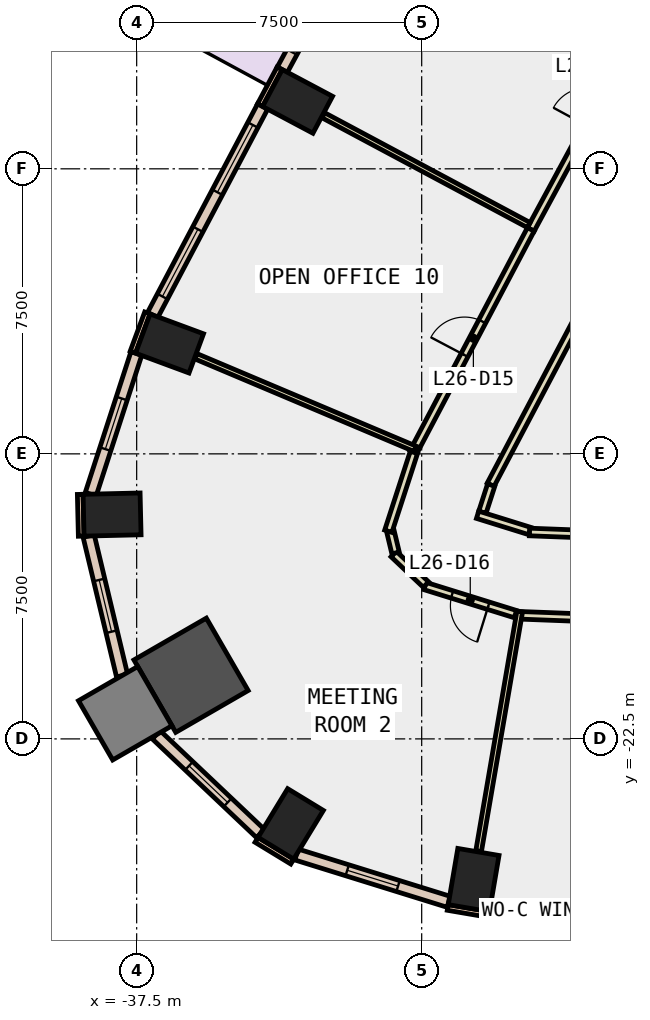
"""IFC4 building model, lengths in metres.
Left out: names, types, materials, properties, quantities, classifications, styles, units other than length and angle.
Written with IfcOpenShell. Run it as: python <this file> out.ifc"""

import sys

from ifc_helpers import new_model, si_unit, direction, frame, frame_2d, origin, origin_2d, place, context, subcontext, project, spatial, rectangle, extrude, element, fill, save


model = new_model("IFC4")
c1 = context("Model", 3, precision=1e-05, world=origin(), true_north=direction((0.0, 1.0)))
c2 = subcontext(c1, "Body", "Model", "MODEL_VIEW")
j1 = project(units=[si_unit("LENGTHUNIT", "METRE"), si_unit("PLANEANGLEUNIT", "RADIAN")], contexts=[c1])
p1 = place(None, origin())
s1 = spatial("IfcSite", under=j1, at=p1, CompositionType="ELEMENT")
p2 = place(p1, origin())
s2 = spatial("IfcBuilding", under=s1, at=p2, CompositionType="ELEMENT")
p3 = place(p2, frame((0.0, 0.0, 120.2)))
s3 = spatial("IfcBuildingStorey", under=s2, at=p3, CompositionType="ELEMENT", Elevation=120.2)
for number, where, z_axis, x_axis in (
    (1, (-28.633, -26.214, -0.4), (0.0, 0.0, 1.0), (-0.986, 0.168, 0.0)),
    (2, (-33.266, -5.726, -0.4), (0.0, 0.0, 1.0), (0.469, 0.883, 0.0)),
    (3, (-36.635, -12.096, -0.4), (0.0, 0.0, 1.0), (0.347, 0.938, 0.0)),
    (4, (-38.147, -16.597, -0.4), (0.0, 0.0, 1.0), (-0.023, 1.0, 0.0)),
):
    element("IfcColumn", number, at=place(p3, frame(where, z_axis=z_axis, x_axis=x_axis)), inside=s3, PredefinedType="COLUMN", context=c2, shape_type="SweptSolid", body=[
        extrude(rectangle(XDim=1.1, YDim=1.5, at=origin_2d()), origin(), (0.0, 0.0, 1.0), 4.2),
    ])
p4 = place(p3, frame((-36.069, -20.825, -0.4), z_axis=(0.0, 0.0, 1.0), x_axis=(0.866025403784, 0.5, 0.0)))
e5 = element("IfcColumn", 5, at=p4, inside=s3, PredefinedType="COLUMN", context=c2, shape_type="SweptSolid", body=[
    extrude(rectangle(XDim=2.2, YDim=2.2, at=origin_2d()), origin(), (0.0, 0.0, 1.0), 4.2),
])
p5 = place(p3, frame((-33.447, -24.737, -0.4), z_axis=(0.0, 0.0, 1.0), x_axis=(-0.854095929175, 0.520115510024, 0.0)))
e6 = element("IfcColumn", 6, at=p5, inside=s3, PredefinedType="COLUMN", context=c2, shape_type="SweptSolid", body=[
    extrude(rectangle(XDim=1.1, YDim=1.5, at=origin_2d()), origin(), (0.0, 0.0, 1.0), 4.2),
])
p6 = place(p3, frame((-37.801, -21.825, -0.4), z_axis=(0.0, 0.0, 1.0), x_axis=(0.866025403784, 0.5, 0.0)))
e7 = element("IfcColumn", 7, at=p6, inside=s3, PredefinedType="COLUMN", context=c2, shape_type="SweptSolid", body=[
    extrude(rectangle(XDim=1.8, YDim=1.8, at=origin_2d()), origin(), (0.0, 0.0, 1.0), 4.2),
])
p7 = place(p3, frame((-33.737, -4.854, 0.0), z_axis=(0.0, 0.0, 1.0), x_axis=(-0.46919310775, -0.883095593716, 0.0)))
e8 = element("IfcWall", 8, at=p7, inside=s3, PredefinedType="STANDARD", context=c2, shape_type="SweptSolid", body=[
    extrude(rectangle(XDim=1.099, YDim=0.15, at=frame_2d((0.55, 0.0))), origin(), (0.0, 0.0, 1.0), 3.8),
])
p8 = place(p3, frame((-37.218, -11.293, 0.0), z_axis=(0.0, 0.0, 1.0), x_axis=(-0.347205967468, -0.937788897436, 0.0)))
e9 = element("IfcWall", 9, at=p8, inside=s3, PredefinedType="STANDARD", context=c2, shape_type="SweptSolid", body=[
    extrude(rectangle(XDim=1.1, YDim=0.15, at=frame_2d((0.55, 0.0))), origin(), (0.0, 0.0, 1.0), 3.8),
])
p9 = place(p3, frame((-29.314, -26.935, 0.0), z_axis=(0.0, 0.0, 1.0), x_axis=(0.985763338892, -0.168138751323, 0.0)))
e10 = element("IfcWall", 10, at=p9, inside=s3, PredefinedType="STANDARD", context=c2, shape_type="SweptSolid", body=[
    extrude(rectangle(XDim=1.101, YDim=0.15, at=frame_2d((0.55, 0.0))), origin(), (0.0, 0.0, 1.0), 3.8),
])
for number, where, z_axis, x_axis in (
    (11, (-38.985, -16.066, 0.0), (0.0, 0.0, 1.0), (0.024, -1.0, 0.0)),
    (12, (-34.346, -25.156, 0.0), (0.0, 0.0, 1.0), (0.854, -0.52, 0.0)),
):
    element("IfcWall", number, at=place(p3, frame(where, z_axis=z_axis, x_axis=x_axis)), inside=s3, PredefinedType="STANDARD", context=c2, shape_type="SweptSolid", body=[
        extrude(rectangle(XDim=1.1, YDim=0.15, at=frame_2d((0.55, 0.0))), origin(), (0.0, 0.0, 1.0), 3.8),
    ])
p10 = place(p3, frame((-28.205, -26.973, 0.0), z_axis=(0.0, 0.0, 1.0), x_axis=(0.999266319694, -0.03829911651, 0.0)))
e13 = element("IfcWall", 13, at=p10, inside=s3, PredefinedType="STANDARD", context=c2, shape_type="SweptSolid", body=[
    extrude(rectangle(XDim=5.877, YDim=0.3, at=frame_2d((2.939, 0.0))), origin(), (0.0, 0.0, 1.0), 3.8),
])
p11 = place(p10, frame((0.469, 0.0, 0.9)))
e14 = element("IfcOpeningElement", 14, at=p11, cuts=e13, PredefinedType="OPENING", context=c2, shape_type="SweptSolid", body=[
    extrude(rectangle(XDim=2.0, YDim=2.6, at=frame_2d((1.0, 1.3))), frame((0.0, 0.16, 0.0), z_axis=(0.0, -1.0, 0.0), x_axis=(1.0, 0.0, 0.0)), (0.0, 0.0, 1.0), 0.32),
])
p12 = place(p10, frame((3.408, 0.0, 0.9)))
e15 = element("IfcOpeningElement", 15, at=p12, cuts=e13, PredefinedType="OPENING", context=c2, shape_type="SweptSolid", body=[
    extrude(rectangle(XDim=2.0, YDim=2.6, at=frame_2d((1.0, 1.3))), frame((0.0, 0.16, 0.0), z_axis=(0.0, -1.0, 0.0), x_axis=(1.0, 0.0, 0.0)), (0.0, 0.0, 1.0), 0.32),
])
p13 = place(p3, frame((-30.758, 0.481, 0.0), z_axis=(0.0, 0.0, 1.0), x_axis=(-0.476097776444, -0.879392351152, 0.0)))
e16 = element("IfcWall", 16, at=p13, inside=s3, PredefinedType="STANDARD", context=c2, shape_type="SweptSolid", body=[
    extrude(rectangle(XDim=6.11, YDim=0.3, at=frame_2d((3.055, 0.0))), origin(), (0.0, 0.0, 1.0), 3.8),
])
p14 = place(p13, frame((0.527, 0.0, 0.0)))
e17 = element("IfcOpeningElement", 17, at=p14, cuts=e16, PredefinedType="OPENING", context=c2, shape_type="SweptSolid", body=[
    extrude(rectangle(XDim=2.0, YDim=2.4, at=frame_2d((1.0, 1.2))), frame((0.0, 0.16, 0.0), z_axis=(0.0, -1.0, 0.0), x_axis=(1.0, 0.0, 0.0)), (0.0, 0.0, 1.0), 0.32),
])
p15 = place(p13, frame((3.582, 0.0, 0.9)))
e18 = element("IfcOpeningElement", 18, at=p15, cuts=e16, PredefinedType="OPENING", context=c2, shape_type="SweptSolid", body=[
    extrude(rectangle(XDim=2.0, YDim=2.6, at=frame_2d((1.0, 1.3))), frame((0.0, 0.16, 0.0), z_axis=(0.0, -1.0, 0.0), x_axis=(1.0, 0.0, 0.0)), (0.0, 0.0, 1.0), 0.32),
])
p16 = place(p3, frame((-34.185, -5.86, 0.0), z_axis=(0.0, 0.0, 1.0), x_axis=(-0.466599547852, -0.88446868907, 0.0)))
e19 = element("IfcWall", 19, at=p16, inside=s3, PredefinedType="STANDARD", context=c2, shape_type="SweptSolid", body=[
    extrude(rectangle(XDim=6.202, YDim=0.3, at=frame_2d((3.101, 0.0))), origin(), (0.0, 0.0, 1.0), 3.8),
])
p17 = place(p16, frame((0.551, 0.0, 0.9)))
e20 = element("IfcOpeningElement", 20, at=p17, cuts=e19, PredefinedType="OPENING", context=c2, shape_type="SweptSolid", body=[
    extrude(rectangle(XDim=2.0, YDim=2.6, at=frame_2d((1.0, 1.3))), frame((0.0, 0.16, 0.0), z_axis=(0.0, -1.0, 0.0), x_axis=(1.0, 0.0, 0.0)), (0.0, 0.0, 1.0), 0.32),
])
p18 = place(p16, frame((3.652, 0.0, 0.9)))
e21 = element("IfcOpeningElement", 21, at=p18, cuts=e19, PredefinedType="OPENING", context=c2, shape_type="SweptSolid", body=[
    extrude(rectangle(XDim=2.0, YDim=2.6, at=frame_2d((1.0, 1.3))), frame((0.0, 0.16, 0.0), z_axis=(0.0, -1.0, 0.0), x_axis=(1.0, 0.0, 0.0)), (0.0, 0.0, 1.0), 0.32),
])
p19 = place(p3, frame((-37.508, -12.358, 0.0), z_axis=(0.0, 0.0, 1.0), x_axis=(-0.308484760821, -0.951229284842, 0.0)))
e22 = element("IfcWall", 22, at=p19, inside=s3, PredefinedType="STANDARD", context=c2, shape_type="SweptSolid", body=[
    extrude(rectangle(XDim=3.893, YDim=0.3, at=frame_2d((1.947, 0.0))), origin(), (0.0, 0.0, 1.0), 3.8),
])
p20 = place(p19, frame((1.246, 0.0, 0.9)))
e23 = element("IfcOpeningElement", 23, at=p20, cuts=e22, PredefinedType="OPENING", context=c2, shape_type="SweptSolid", body=[
    extrude(rectangle(XDim=1.4, YDim=2.6, at=frame_2d((0.7, 1.3))), frame((0.0, 0.16, 0.0), z_axis=(0.0, -1.0, 0.0), x_axis=(1.0, 0.0, 0.0)), (0.0, 0.0, 1.0), 0.32),
])
p21 = place(p3, frame((-38.763, -17.161, 0.0), z_axis=(0.0, 0.0, 1.0), x_axis=(0.232654276823, -0.972559503309, 0.0)))
e24 = element("IfcWall", 24, at=p21, inside=s3, PredefinedType="STANDARD", context=c2, shape_type="SweptSolid", body=[
    extrude(rectangle(XDim=3.778, YDim=0.3, at=frame_2d((1.889, 0.0))), origin(), (0.0, 0.0, 1.0), 3.8),
])
p22 = place(p21, frame((1.189, 0.0, 0.9)))
e25 = element("IfcOpeningElement", 25, at=p22, cuts=e24, PredefinedType="OPENING", context=c2, shape_type="SweptSolid", body=[
    extrude(rectangle(XDim=1.4, YDim=2.6, at=frame_2d((0.7, 1.3))), frame((0.0, 0.16, 0.0), z_axis=(0.0, -1.0, 0.0), x_axis=(1.0, 0.0, 0.0)), (0.0, 0.0, 1.0), 0.32),
])
p23 = place(p3, frame((-36.985, -22.392, 0.0), z_axis=(0.0, 0.0, 1.0), x_axis=(0.726076674532, -0.687613745281, 0.0)))
e26 = element("IfcWall", 26, at=p23, inside=s3, PredefinedType="STANDARD", context=c2, shape_type="SweptSolid", body=[
    extrude(rectangle(XDim=3.777, YDim=0.3, at=frame_2d((1.888, 0.0))), origin(), (0.0, 0.0, 1.0), 3.8),
])
p24 = place(p23, frame((1.188, 0.0, 0.9)))
e27 = element("IfcOpeningElement", 27, at=p24, cuts=e26, PredefinedType="OPENING", context=c2, shape_type="SweptSolid", body=[
    extrude(rectangle(XDim=1.4, YDim=2.6, at=frame_2d((0.7, 1.3))), frame((0.0, 0.16, 0.0), z_axis=(0.0, -1.0, 0.0), x_axis=(1.0, 0.0, 0.0)), (0.0, 0.0, 1.0), 0.32),
])
p25 = place(p3, frame((-33.294, -25.542, 0.0), z_axis=(0.0, 0.0, 1.0), x_axis=(0.954955020021, -0.296750585066, 0.0)))
e28 = element("IfcWall", 28, at=p25, inside=s3, PredefinedType="STANDARD", context=c2, shape_type="SweptSolid", body=[
    extrude(rectangle(XDim=4.196, YDim=0.3, at=frame_2d((2.098, 0.0))), origin(), (0.0, 0.0, 1.0), 3.8),
])
p26 = place(p25, frame((1.398, 0.0, 0.9)))
e29 = element("IfcOpeningElement", 29, at=p26, cuts=e28, PredefinedType="OPENING", context=c2, shape_type="SweptSolid", body=[
    extrude(rectangle(XDim=1.4, YDim=2.6, at=frame_2d((0.7, 1.3))), frame((0.0, 0.16, 0.0), z_axis=(0.0, -1.0, 0.0), x_axis=(1.0, 0.0, 0.0)), (0.0, 0.0, 1.0), 0.32),
])
p27 = place(p3, frame((-25.153, -10.065, 0.0), z_axis=(0.0, 0.0, 1.0), x_axis=(-0.466663976618, -0.884434696813, 0.0)))
e30 = element("IfcWall", 30, at=p27, inside=s3, PredefinedType="PARTITIONING", context=c2, shape_type="SweptSolid", body=[
    extrude(rectangle(XDim=6.501, YDim=0.2, at=frame_2d((3.25, 0.0))), origin(), (0.0, 0.0, 1.0), 3.8),
])
p28 = place(p3, frame((-28.171, -15.821, 0.0), z_axis=(0.0, 0.0, 1.0), x_axis=(-0.308053137273, -0.951369152651, 0.0)))
e31 = element("IfcWall", 31, at=p28, inside=s3, PredefinedType="PARTITIONING", context=c2, shape_type="SweptSolid", body=[
    extrude(rectangle(XDim=0.754, YDim=0.2, at=frame_2d((0.377, 0.0))), origin(), (0.0, 0.0, 1.0), 3.8),
])
p29 = place(p3, frame((-28.529, -16.603, 0.0), z_axis=(0.0, 0.0, 1.0), x_axis=(0.954829998701, -0.297152609916, 0.0)))
e32 = element("IfcWall", 32, at=p29, inside=s3, PredefinedType="PARTITIONING", context=c2, shape_type="SweptSolid", body=[
    extrude(rectangle(XDim=1.437, YDim=0.2, at=frame_2d((0.719, 0.0))), origin(), (0.0, 0.0, 1.0), 3.8),
])
p30 = place(p3, frame((-27.162, -17.056, 0.0), z_axis=(0.0, 0.0, 1.0), x_axis=(0.999270868304, -0.038180253525, 0.0)))
e33 = element("IfcWall", 33, at=p30, inside=s3, PredefinedType="PARTITIONING", context=c2, shape_type="SweptSolid", body=[
    extrude(rectangle(XDim=5.71, YDim=0.2, at=frame_2d((2.855, 0.0))), origin(), (0.0, 0.0, 1.0), 3.8),
])
p31 = place(p3, frame((-27.129, -9.094, 0.0), z_axis=(0.0, 0.0, 1.0), x_axis=(0.476090835435, 0.879396108938, 0.0)))
e34 = element("IfcWall", 34, at=p31, inside=s3, PredefinedType="PARTITIONING", context=c2, shape_type="SweptSolid", body=[
    extrude(rectangle(XDim=7.198, YDim=0.2, at=frame_2d((3.599, 0.0))), origin(), (0.0, 0.0, 1.0), 3.8),
])
p32 = place(p31, frame((3.099, 0.0, 0.0)))
e35 = element("IfcOpeningElement", 35, at=p32, cuts=e34, PredefinedType="OPENING", context=c2, shape_type="SweptSolid", body=[
    extrude(rectangle(XDim=1.0, YDim=2.1, at=frame_2d((0.5, 1.05))), frame((0.0, 0.11, 0.0), z_axis=(0.0, -1.0, 0.0), x_axis=(1.0, 0.0, 0.0)), (0.0, 0.0, 1.0), 0.22),
])
p33 = place(p3, frame((-30.221, -14.956, 0.0), z_axis=(0.0, 0.0, 1.0), x_axis=(0.466543318111, 0.884498350663, 0.0)))
e36 = element("IfcWall", 36, at=p33, inside=s3, PredefinedType="PARTITIONING", context=c2, shape_type="SweptSolid", body=[
    extrude(rectangle(XDim=6.627, YDim=0.2, at=frame_2d((3.314, 0.0))), origin(), (0.0, 0.0, 1.0), 3.8),
])
p34 = place(p33, frame((2.889, 0.0, 0.0)))
e37 = element("IfcOpeningElement", 37, at=p34, cuts=e36, PredefinedType="OPENING", context=c2, shape_type="SweptSolid", body=[
    extrude(rectangle(XDim=1.0, YDim=2.1, at=frame_2d((0.5, 1.05))), frame((0.0, 0.11, 0.0), z_axis=(0.0, -1.0, 0.0), x_axis=(1.0, 0.0, 0.0)), (0.0, 0.0, 1.0), 0.22),
])
p35 = place(p3, frame((-27.533, -19.217, 0.0), z_axis=(0.0, 0.0, 1.0), x_axis=(-0.954946345159, 0.296778499671, 0.0)))
e38 = element("IfcWall", 38, at=p35, inside=s3, PredefinedType="PARTITIONING", context=c2, shape_type="SweptSolid", body=[
    extrude(rectangle(XDim=2.49, YDim=0.2, at=frame_2d((1.245, 0.0))), origin(), (0.0, 0.0, 1.0), 3.8),
])
p36 = place(p35, frame((0.745, 0.0, 0.0)))
e39 = element("IfcOpeningElement", 39, at=p36, cuts=e38, PredefinedType="OPENING", context=c2, shape_type="SweptSolid", body=[
    extrude(rectangle(XDim=1.0, YDim=2.1, at=frame_2d((0.5, 1.05))), frame((0.0, 0.11, 0.0), z_axis=(0.0, -1.0, 0.0), x_axis=(1.0, 0.0, 0.0)), (0.0, 0.0, 1.0), 0.22),
])
p37 = place(p3, frame((-29.888, -18.439, 0.0), z_axis=(0.0, 0.0, 1.0), x_axis=(-0.726155646563, 0.687530346214, 0.0)))
e40 = element("IfcWall", 40, at=p37, inside=s3, PredefinedType="PARTITIONING", context=c2, shape_type="SweptSolid", body=[
    extrude(rectangle(XDim=1.169, YDim=0.2, at=frame_2d((0.585, 0.0))), origin(), (0.0, 0.0, 1.0), 3.8),
])
p38 = place(p3, frame((-30.687, -17.607, 0.0), z_axis=(0.0, 0.0, 1.0), x_axis=(-0.232504544059, 0.972595309978, 0.0)))
e41 = element("IfcWall", 41, at=p38, inside=s3, PredefinedType="PARTITIONING", context=c2, shape_type="SweptSolid", body=[
    extrude(rectangle(XDim=0.585, YDim=0.2, at=frame_2d((0.292, 0.0))), origin(), (0.0, 0.0, 1.0), 3.8),
])
p39 = place(p3, frame((-30.878, -17.036, 0.0), z_axis=(0.0, 0.0, 1.0), x_axis=(0.308592319841, 0.951194396606, 0.0)))
e42 = element("IfcWall", 42, at=p39, inside=s3, PredefinedType="PARTITIONING", context=c2, shape_type="SweptSolid", body=[
    extrude(rectangle(XDim=2.18, YDim=0.2, at=frame_2d((1.09, 0.0))), origin(), (0.0, 0.0, 1.0), 3.8),
])
p40 = place(p3, frame((-21.529, -19.473, 0.0), z_axis=(0.0, 0.0, 1.0), x_axis=(-0.999270076349, 0.038200975307, 0.0)))
e43 = element("IfcWall", 43, at=p40, inside=s3, PredefinedType="PARTITIONING", context=c2, shape_type="SweptSolid", body=[
    extrude(rectangle(XDim=5.937, YDim=0.2, at=frame_2d((2.969, 0.0))), origin(), (0.0, 0.0, 1.0), 3.8),
])
p41 = place(p40, frame((2.469, 0.0, 0.0)))
e44 = element("IfcOpeningElement", 44, at=p41, cuts=e43, PredefinedType="OPENING", context=c2, shape_type="SweptSolid", body=[
    extrude(rectangle(XDim=1.0, YDim=2.1, at=frame_2d((0.5, 1.05))), frame((0.0, 0.11, 0.0), z_axis=(0.0, -1.0, 0.0), x_axis=(1.0, 0.0, 0.0)), (0.0, 0.0, 1.0), 0.22),
])
p42 = place(p3, frame((-27.182, -8.981, 0.0), z_axis=(0.0, 0.0, 1.0), x_axis=(-0.881899408669, 0.471437623647, 0.0)))
e45 = element("IfcWall", 45, at=p42, inside=s3, PredefinedType="PARTITIONING", context=c2, shape_type="SweptSolid", body=[
    extrude(rectangle(XDim=6.13, YDim=0.15, at=frame_2d((3.065, 0.0))), origin(), (0.0, 0.0, 1.0), 3.8),
])
p43 = place(p3, frame((-30.174, -14.867, 0.0), z_axis=(0.0, 0.0, 1.0), x_axis=(-0.921262609517, 0.388941132185, 0.0)))
e46 = element("IfcWall", 46, at=p43, inside=s3, PredefinedType="PARTITIONING", context=c2, shape_type="SweptSolid", body=[
    extrude(rectangle(XDim=6.258, YDim=0.15, at=frame_2d((3.129, 0.0))), origin(), (0.0, 0.0, 1.0), 3.8),
])
p44 = place(p3, frame((-27.42, -19.148, 0.0), z_axis=(0.0, 0.0, 1.0), x_axis=(-0.169086648341, -0.985601189809, 0.0)))
e47 = element("IfcWall", 47, at=p44, inside=s3, PredefinedType="PARTITIONING", context=c2, shape_type="SweptSolid", body=[
    extrude(rectangle(XDim=6.399, YDim=0.15, at=frame_2d((3.2, 0.0))), origin(), (0.0, 0.0, 1.0), 3.8),
])
p45 = place(p11, origin())
e48 = element("IfcWindow", 48, at=p45, inside=s3, PartitioningType="SINGLE_PANEL", PredefinedType="WINDOW", context=c2, shape_type="SweptSolid", body=[
    extrude(rectangle(XDim=2.0, YDim=2.6, at=frame_2d((1.0, 1.3))), frame((0.0, 0.03, 0.0), z_axis=(0.0, -1.0, 0.0), x_axis=(1.0, 0.0, 0.0)), (0.0, 0.0, 1.0), 0.06),
])
fill(e14, e48)
p46 = place(p17, origin())
e49 = element("IfcWindow", 49, at=p46, inside=s3, PartitioningType="SINGLE_PANEL", PredefinedType="WINDOW", context=c2, shape_type="SweptSolid", body=[
    extrude(rectangle(XDim=2.0, YDim=2.6, at=frame_2d((1.0, 1.3))), frame((0.0, 0.03, 0.0), z_axis=(0.0, -1.0, 0.0), x_axis=(1.0, 0.0, 0.0)), (0.0, 0.0, 1.0), 0.06),
])
fill(e20, e49)
p47 = place(p18, origin())
e50 = element("IfcWindow", 50, at=p47, inside=s3, PartitioningType="SINGLE_PANEL", PredefinedType="WINDOW", context=c2, shape_type="SweptSolid", body=[
    extrude(rectangle(XDim=2.0, YDim=2.6, at=frame_2d((1.0, 1.3))), frame((0.0, 0.03, 0.0), z_axis=(0.0, -1.0, 0.0), x_axis=(1.0, 0.0, 0.0)), (0.0, 0.0, 1.0), 0.06),
])
fill(e21, e50)
p48 = place(p20, origin())
e51 = element("IfcWindow", 51, at=p48, inside=s3, PartitioningType="SINGLE_PANEL", PredefinedType="WINDOW", context=c2, shape_type="SweptSolid", body=[
    extrude(rectangle(XDim=1.4, YDim=2.6, at=frame_2d((0.7, 1.3))), frame((0.0, 0.03, 0.0), z_axis=(0.0, -1.0, 0.0), x_axis=(1.0, 0.0, 0.0)), (0.0, 0.0, 1.0), 0.06),
])
fill(e23, e51)
p49 = place(p22, origin())
e52 = element("IfcWindow", 52, at=p49, inside=s3, PartitioningType="SINGLE_PANEL", PredefinedType="WINDOW", context=c2, shape_type="SweptSolid", body=[
    extrude(rectangle(XDim=1.4, YDim=2.6, at=frame_2d((0.7, 1.3))), frame((0.0, 0.03, 0.0), z_axis=(0.0, -1.0, 0.0), x_axis=(1.0, 0.0, 0.0)), (0.0, 0.0, 1.0), 0.06),
])
fill(e25, e52)
p50 = place(p24, origin())
e53 = element("IfcWindow", 53, at=p50, inside=s3, PartitioningType="SINGLE_PANEL", PredefinedType="WINDOW", context=c2, shape_type="SweptSolid", body=[
    extrude(rectangle(XDim=1.4, YDim=2.6, at=frame_2d((0.7, 1.3))), frame((0.0, 0.03, 0.0), z_axis=(0.0, -1.0, 0.0), x_axis=(1.0, 0.0, 0.0)), (0.0, 0.0, 1.0), 0.06),
])
fill(e27, e53)
p51 = place(p26, origin())
e54 = element("IfcWindow", 54, at=p51, inside=s3, PartitioningType="SINGLE_PANEL", PredefinedType="WINDOW", context=c2, shape_type="SweptSolid", body=[
    extrude(rectangle(XDim=1.4, YDim=2.6, at=frame_2d((0.7, 1.3))), frame((0.0, 0.03, 0.0), z_axis=(0.0, -1.0, 0.0), x_axis=(1.0, 0.0, 0.0)), (0.0, 0.0, 1.0), 0.06),
])
fill(e29, e54)
p52 = place(p34, origin())
e55 = element("IfcDoor", 55, at=p52, inside=s3, OperationType="SINGLE_SWING_LEFT", PredefinedType="DOOR", context=c2, shape_type="SweptSolid", body=[
    extrude(rectangle(XDim=1.0, YDim=2.1, at=frame_2d((0.5, 1.05))), frame((0.0, 0.025, 0.0), z_axis=(0.0, -1.0, 0.0), x_axis=(1.0, 0.0, 0.0)), (0.0, 0.0, 1.0), 0.05),
])
fill(e37, e55)
p53 = place(p36, origin())
e56 = element("IfcDoor", 56, at=p53, inside=s3, OperationType="SINGLE_SWING_LEFT", PredefinedType="DOOR", context=c2, shape_type="SweptSolid", body=[
    extrude(rectangle(XDim=1.0, YDim=2.1, at=frame_2d((0.5, 1.05))), frame((0.0, 0.025, 0.0), z_axis=(0.0, -1.0, 0.0), x_axis=(1.0, 0.0, 0.0)), (0.0, 0.0, 1.0), 0.05),
])
fill(e39, e56)
save(model, sys.argv[1])
